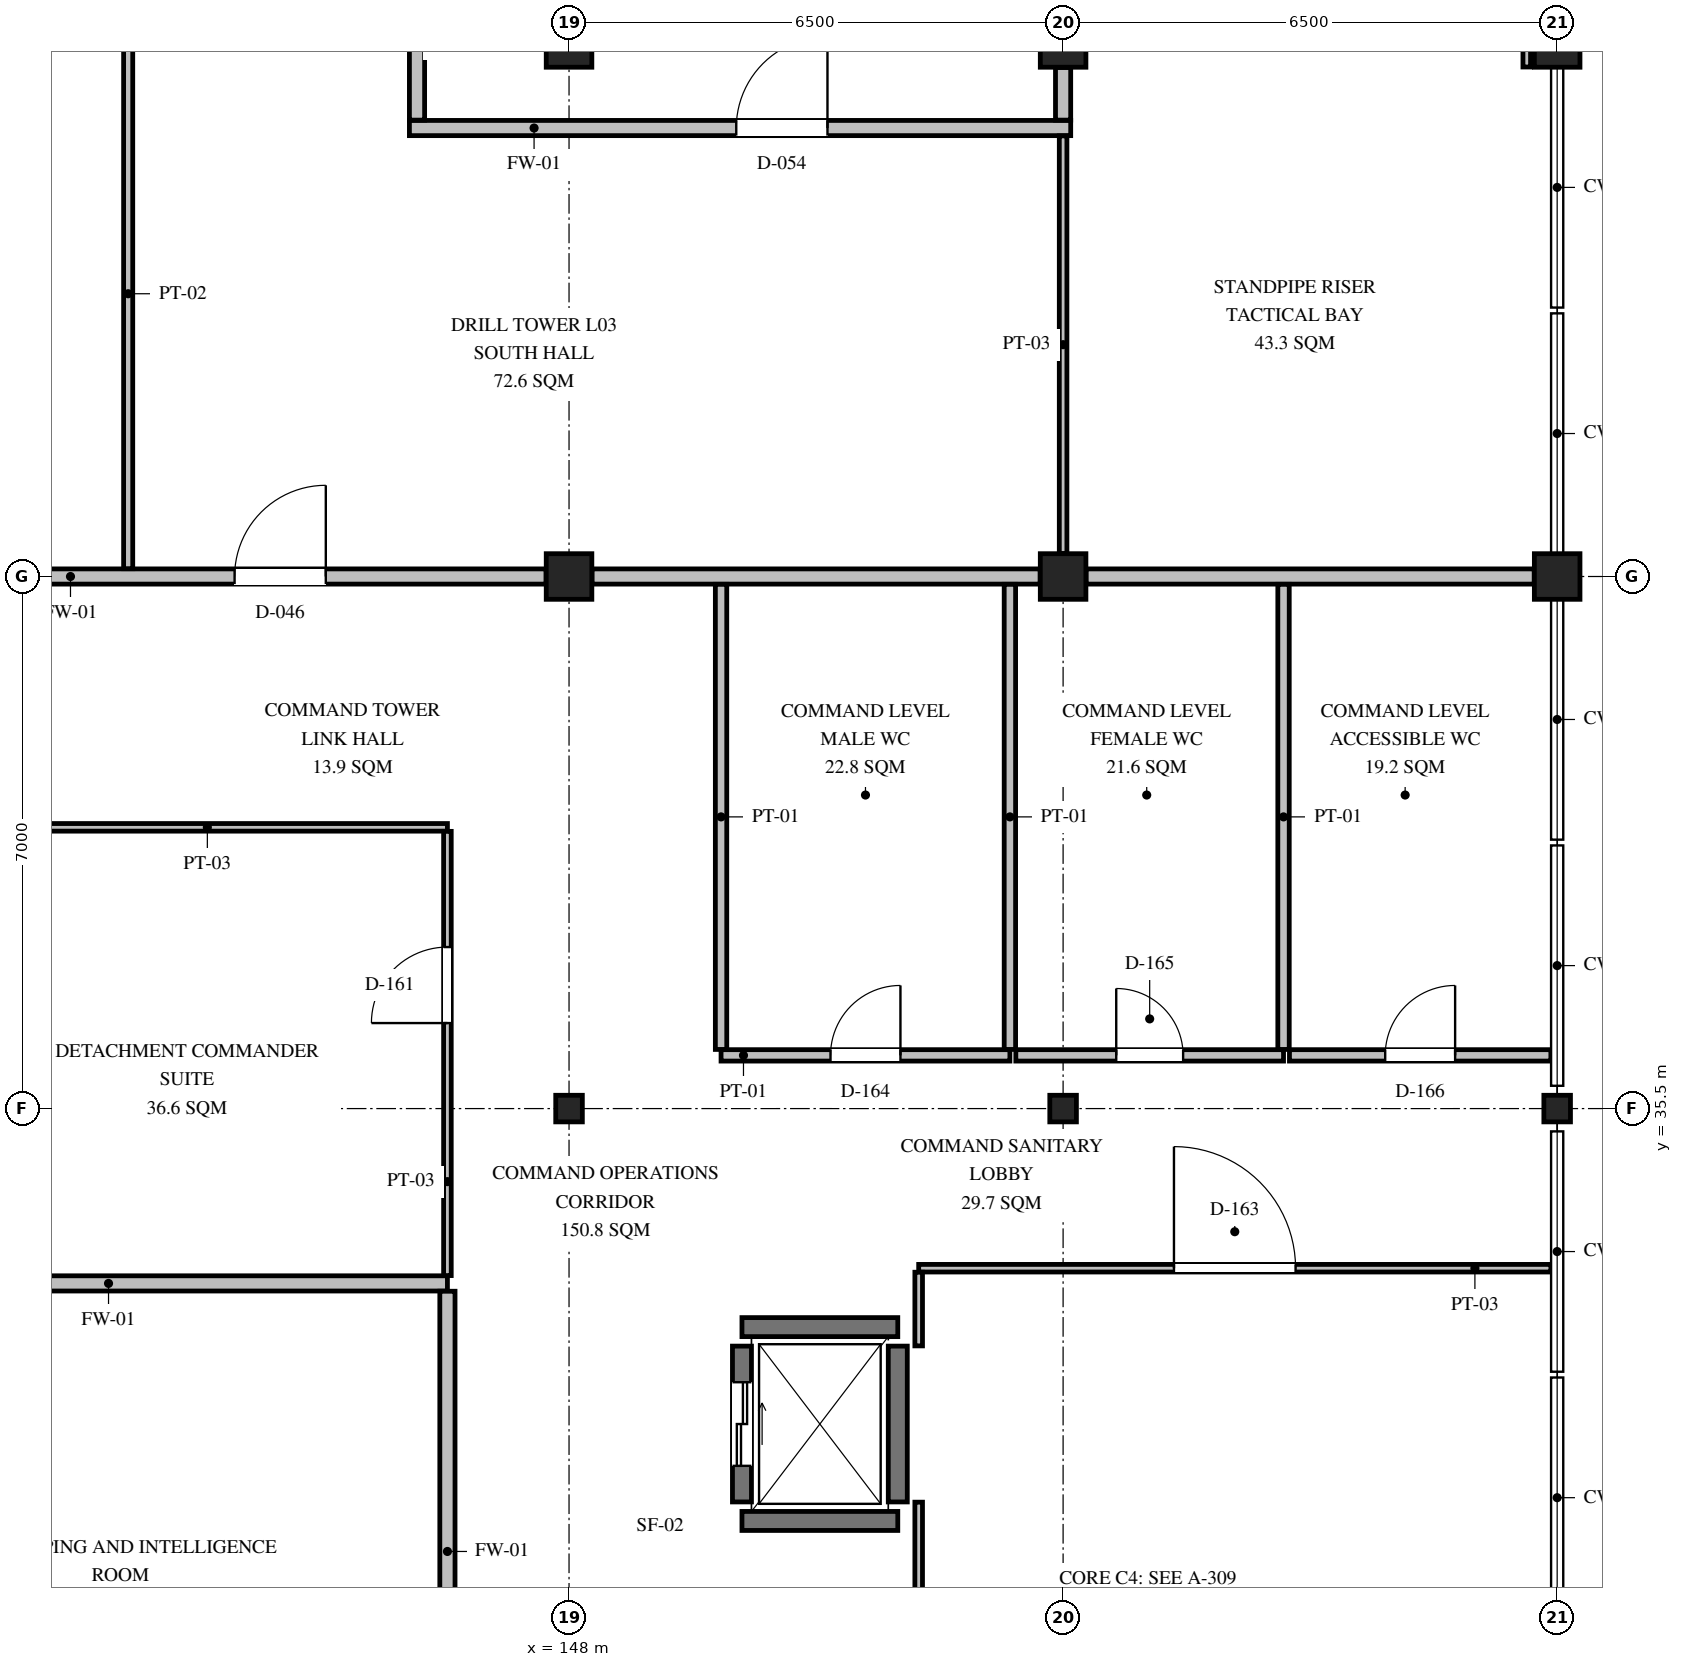
"""IFC4 building model, lengths in metres.
Left out: names, types, materials, properties, quantities, classifications, styles, units other than length and angle.
Written with IfcOpenShell. Run it as: python <this file> out.ifc"""

import sys

from ifc_helpers import new_model, si_unit, direction, frame, frame_2d, origin, origin_2d, place, context, subcontext, project, spatial, rectangle, i_section, extrude, element, fill, save


model = new_model("IFC4")
c1 = context("Model", 3, precision=1e-05, world=origin(), true_north=direction((0.0, 1.0)))
c2 = subcontext(c1, "Body", "Model", "MODEL_VIEW")
j1 = project(units=[si_unit("LENGTHUNIT", "METRE"), si_unit("PLANEANGLEUNIT", "RADIAN")], contexts=[c1])
p1 = place(None, origin())
s1 = spatial("IfcSite", under=j1, at=p1, CompositionType="ELEMENT")
p2 = place(p1, origin())
s2 = spatial("IfcBuilding", under=s1, at=p2, CompositionType="ELEMENT")
p3 = place(p2, frame((0.0, 0.0, 10.05)))
s3 = spatial("IfcBuildingStorey", under=s2, at=p3, CompositionType="ELEMENT", Elevation=10.05)
p4 = place(p3, frame((148.0, 35.5, 0.0), z_axis=(0.0, 0.0, 1.0), x_axis=(1.0, 0.0, 0.0)))
e1 = element("IfcColumn", 1, at=p4, inside=s3, PredefinedType="COLUMN", context=c2, shape_type="SweptSolid", body=[
    extrude(i_section(OverallWidth=0.35, OverallDepth=0.35, WebThickness=0.012, FlangeThickness=0.019, FilletRadius=0.02, at=origin_2d()), origin(), (0.0, 0.0, 1.0), 4.2),
])
for number, where, z_axis, x_axis in (
    (2, (148.0, 42.5, 0.0), (0.0, 0.0, 1.0), (1.0, 0.0, 0.0)),
    (3, (148.0, 49.5, 0.0), (0.0, 0.0, 1.0), (1.0, 0.0, 0.0)),
):
    element("IfcColumn", number, at=place(p3, frame(where, z_axis=z_axis, x_axis=x_axis)), inside=s3, PredefinedType="COLUMN", context=c2, shape_type="SweptSolid", body=[
        extrude(rectangle(XDim=0.6, YDim=0.6, at=origin_2d()), origin(), (0.0, 0.0, 1.0), 4.2),
    ])
p5 = place(p3, frame((154.5, 35.5, 0.0), z_axis=(0.0, 0.0, 1.0), x_axis=(1.0, 0.0, 0.0)))
e4 = element("IfcColumn", 4, at=p5, inside=s3, PredefinedType="COLUMN", context=c2, shape_type="SweptSolid", body=[
    extrude(i_section(OverallWidth=0.35, OverallDepth=0.35, WebThickness=0.012, FlangeThickness=0.019, FilletRadius=0.02, at=origin_2d()), origin(), (0.0, 0.0, 1.0), 4.2),
])
for number, where, z_axis, x_axis in (
    (5, (154.5, 42.5, 0.0), (0.0, 0.0, 1.0), (1.0, 0.0, 0.0)),
    (6, (154.5, 49.5, 0.0), (0.0, 0.0, 1.0), (1.0, 0.0, 0.0)),
):
    element("IfcColumn", number, at=place(p3, frame(where, z_axis=z_axis, x_axis=x_axis)), inside=s3, PredefinedType="COLUMN", context=c2, shape_type="SweptSolid", body=[
        extrude(rectangle(XDim=0.6, YDim=0.6, at=origin_2d()), origin(), (0.0, 0.0, 1.0), 4.2),
    ])
p6 = place(p3, frame((161.0, 35.5, 0.0), z_axis=(0.0, 0.0, 1.0), x_axis=(1.0, 0.0, 0.0)))
e7 = element("IfcColumn", 7, at=p6, inside=s3, PredefinedType="COLUMN", context=c2, shape_type="SweptSolid", body=[
    extrude(i_section(OverallWidth=0.35, OverallDepth=0.35, WebThickness=0.012, FlangeThickness=0.019, FilletRadius=0.02, at=origin_2d()), origin(), (0.0, 0.0, 1.0), 4.2),
])
for number, where, z_axis, x_axis in (
    (8, (161.0, 42.5, 0.0), (0.0, 0.0, 1.0), (1.0, 0.0, 0.0)),
    (9, (161.0, 49.5, 0.0), (0.0, 0.0, 1.0), (1.0, 0.0, 0.0)),
):
    element("IfcColumn", number, at=place(p3, frame(where, z_axis=z_axis, x_axis=x_axis)), inside=s3, PredefinedType="COLUMN", context=c2, shape_type="SweptSolid", body=[
        extrude(rectangle(XDim=0.6, YDim=0.6, at=origin_2d()), origin(), (0.0, 0.0, 1.0), 4.2),
    ])
for number, where, z_axis, x_axis in (
    (10, (150.275, 30.075, 0.0), (0.0, 0.0, 1.0), (1.0, 0.0, 0.0)),
    (11, (150.275, 32.625, 0.0), (0.0, 0.0, 1.0), (1.0, 0.0, 0.0)),
):
    element("IfcWall", number, at=place(p3, frame(where, z_axis=z_axis, x_axis=x_axis)), inside=s3, PredefinedType="SHEAR", context=c2, shape_type="SweptSolid", body=[
        extrude(rectangle(XDim=2.05, YDim=0.25, at=frame_2d((1.025, 0.0))), origin(), (0.0, 0.0, 1.0), 4.0),
    ])
p7 = place(p3, frame((150.275, 30.325, 0.0), z_axis=(0.0, 0.0, 1.0), x_axis=(0.0, 1.0, 0.0)))
e12 = element("IfcWall", 12, at=p7, inside=s3, PredefinedType="SHEAR", context=c2, shape_type="SweptSolid", body=[
    extrude(rectangle(XDim=2.05, YDim=0.25, at=frame_2d((1.025, 0.0))), origin(), (0.0, 0.0, 1.0), 4.0),
])
p8 = place(p7, frame((0.475, 0.0, 0.0)))
e13 = element("IfcOpeningElement", 13, at=p8, cuts=e12, PredefinedType="OPENING", context=c2, shape_type="SweptSolid", body=[
    extrude(rectangle(XDim=1.1, YDim=2.15, at=frame_2d((0.55, 1.075))), frame((0.0, 0.135, 0.0), z_axis=(0.0, -1.0, 0.0), x_axis=(1.0, 0.0, 0.0)), (0.0, 0.0, 1.0), 0.27),
])
p9 = place(p3, frame((152.325, 30.325, 0.0), z_axis=(0.0, 0.0, 1.0), x_axis=(0.0, 1.0, 0.0)))
e14 = element("IfcWall", 14, at=p9, inside=s3, PredefinedType="SHEAR", context=c2, shape_type="SweptSolid", body=[
    extrude(rectangle(XDim=2.05, YDim=0.25, at=frame_2d((1.025, 0.0))), origin(), (0.0, 0.0, 1.0), 4.0),
])
p10 = place(p3, frame((140.302, 42.5, 0.0), z_axis=(0.0, 0.0, 1.0), x_axis=(1.0, 0.0, 0.0)))
e15 = element("IfcWall", 15, at=p10, inside=s3, PredefinedType="PARTITIONING", context=c2, shape_type="SweptSolid", body=[
    extrude(rectangle(XDim=7.396, YDim=0.2, at=frame_2d((3.698, 0.0))), origin(), (0.0, 0.0, 1.0), 3.494),
])
p11 = place(p10, frame((3.298, 0.0, 0.0)))
e16 = element("IfcOpeningElement", 16, at=p11, cuts=e15, PredefinedType="OPENING", context=c2, shape_type="SweptSolid", body=[
    extrude(rectangle(XDim=1.2, YDim=2.15, at=frame_2d((0.6, 1.075))), frame((0.0, 0.11, 0.0), z_axis=(0.0, -1.0, 0.0), x_axis=(1.0, 0.0, 0.0)), (0.0, 0.0, 1.0), 0.22),
])
p12 = place(p3, frame((148.302, 42.5, 0.0), z_axis=(0.0, 0.0, 1.0), x_axis=(1.0, 0.0, 0.0)))
e17 = element("IfcWall", 17, at=p12, inside=s3, PredefinedType="PARTITIONING", context=c2, shape_type="SweptSolid", body=[
    extrude(rectangle(XDim=5.896, YDim=0.2, at=frame_2d((2.948, 0.0))), origin(), (0.0, 0.0, 1.0), 3.554),
])
p13 = place(p3, frame((154.802, 42.5, 0.0), z_axis=(0.0, 0.0, 1.0), x_axis=(1.0, 0.0, 0.0)))
e18 = element("IfcWall", 18, at=p13, inside=s3, PredefinedType="PARTITIONING", context=c2, shape_type="SweptSolid", body=[
    extrude(rectangle(XDim=5.896, YDim=0.2, at=frame_2d((2.948, 0.0))), origin(), (0.0, 0.0, 1.0), 3.604),
])
p14 = place(p3, frame((145.9, 48.4, 0.0), z_axis=(0.0, 0.0, 1.0), x_axis=(1.0, 0.0, 0.0)))
e19 = element("IfcWall", 19, at=p14, inside=s3, PredefinedType="PARTITIONING", context=c2, shape_type="SweptSolid", body=[
    extrude(rectangle(XDim=8.7, YDim=0.2, at=frame_2d((4.35, 0.0))), origin(), (0.0, 0.0, 1.0), 4.0),
])
p15 = place(p14, frame((4.3, 0.0, 0.0)))
e20 = element("IfcOpeningElement", 20, at=p15, cuts=e19, PredefinedType="OPENING", context=c2, shape_type="SweptSolid", body=[
    extrude(rectangle(XDim=1.2, YDim=2.15, at=frame_2d((0.6, 1.075))), frame((0.0, 0.11, 0.0), z_axis=(0.0, -1.0, 0.0), x_axis=(1.0, 0.0, 0.0)), (0.0, 0.0, 1.0), 0.22),
])
p16 = place(p3, frame((146.0, 48.504, 0.0), z_axis=(0.0, 0.0, 1.0), x_axis=(0.0, 1.0, 0.0)))
e21 = element("IfcWall", 21, at=p16, inside=s3, PredefinedType="PARTITIONING", context=c2, shape_type="SweptSolid", body=[
    extrude(rectangle(XDim=3.967, YDim=0.2, at=frame_2d((1.983, 0.0))), origin(), (0.0, 0.0, 1.0), 4.0),
])
p17 = place(p16, frame((1.946, 0.0, 0.0)))
e22 = element("IfcOpeningElement", 22, at=p17, cuts=e21, PredefinedType="OPENING", context=c2, shape_type="SweptSolid", body=[
    extrude(rectangle(XDim=1.2, YDim=2.15, at=frame_2d((0.6, 1.075))), frame((0.0, 0.11, 0.0), z_axis=(0.0, -1.0, 0.0), x_axis=(1.0, 0.0, 0.0)), (0.0, 0.0, 1.0), 0.22),
])
p18 = place(p3, frame((154.5, 48.504, 0.0), z_axis=(0.0, 0.0, 1.0), x_axis=(0.0, 1.0, 0.0)))
e23 = element("IfcWall", 23, at=p18, inside=s3, PredefinedType="PARTITIONING", context=c2, shape_type="SweptSolid", body=[
    extrude(rectangle(XDim=0.692, YDim=0.2, at=frame_2d((0.346, 0.0))), origin(), (0.0, 0.0, 1.0), 3.494),
])
p19 = place(p3, frame((137.483, 33.2, 0.0), z_axis=(0.0, 0.0, 1.0), x_axis=(1.0, 0.0, 0.0)))
e24 = element("IfcWall", 24, at=p19, inside=s3, PredefinedType="PARTITIONING", context=c2, shape_type="SweptSolid", body=[
    extrude(rectangle(XDim=8.917, YDim=0.2, at=frame_2d((4.458, 0.0))), origin(), (0.0, 0.0, 1.0), 4.0),
])
p20 = place(p3, frame((146.4, 16.703, 0.0), z_axis=(0.0, 0.0, 1.0), x_axis=(0.0, 1.0, 0.0)))
e25 = element("IfcWall", 25, at=p20, inside=s3, PredefinedType="PARTITIONING", context=c2, shape_type="SweptSolid", body=[
    extrude(rectangle(XDim=16.394, YDim=0.2, at=frame_2d((8.197, 0.0))), origin(), (0.0, 0.0, 1.0), 3.644),
])
p21 = place(p20, frame((7.697, 0.0, 0.0)))
e26 = element("IfcOpeningElement", 26, at=p21, cuts=e25, PredefinedType="OPENING", context=c2, shape_type="SweptSolid", body=[
    extrude(rectangle(XDim=1.0, YDim=2.1, at=frame_2d((0.5, 1.05))), frame((0.0, 0.11, 0.0), z_axis=(0.0, -1.0, 0.0), x_axis=(1.0, 0.0, 0.0)), (0.0, 0.0, 1.0), 0.22),
])
p22 = place(p3, frame((140.083, 39.2, 0.0), z_axis=(0.0, 0.0, 1.0), x_axis=(1.0, 0.0, 0.0)))
e27 = element("IfcWall", 27, at=p22, inside=s3, PredefinedType="PARTITIONING", context=c2, shape_type="SweptSolid", body=[
    extrude(rectangle(XDim=6.317, YDim=0.1, at=frame_2d((3.158, 0.0))), origin(), (0.0, 0.0, 1.0), 4.0),
])
p23 = place(p3, frame((146.4, 33.303, 0.0), z_axis=(0.0, 0.0, 1.0), x_axis=(0.0, 1.0, 0.0)))
e28 = element("IfcWall", 28, at=p23, inside=s3, PredefinedType="PARTITIONING", context=c2, shape_type="SweptSolid", body=[
    extrude(rectangle(XDim=5.844, YDim=0.1, at=frame_2d((2.922, 0.0))), origin(), (0.0, 0.0, 1.0), 3.7),
])
p24 = place(p23, frame((3.322, 0.0, 0.0)))
e29 = element("IfcOpeningElement", 29, at=p24, cuts=e28, PredefinedType="OPENING", context=c2, shape_type="SweptSolid", body=[
    extrude(rectangle(XDim=1.0, YDim=2.1, at=frame_2d((0.5, 1.05))), frame((0.0, 0.06, 0.0), z_axis=(0.0, -1.0, 0.0), x_axis=(1.0, 0.0, 0.0)), (0.0, 0.0, 1.0), 0.12),
])
p25 = place(p3, frame((152.6, 33.4, 0.0), z_axis=(0.0, 0.0, 1.0), x_axis=(1.0, 0.0, 0.0)))
e30 = element("IfcWall", 30, at=p25, inside=s3, PredefinedType="PARTITIONING", context=c2, shape_type="SweptSolid", body=[
    extrude(rectangle(XDim=8.317, YDim=0.1, at=frame_2d((4.158, 0.0))), origin(), (0.0, 0.0, 1.0), 4.0),
])
p26 = place(p25, frame((3.358, 0.0, 0.0)))
e31 = element("IfcOpeningElement", 31, at=p26, cuts=e30, PredefinedType="OPENING", context=c2, shape_type="SweptSolid", body=[
    extrude(rectangle(XDim=1.6, YDim=2.2, at=frame_2d((0.8, 1.1))), frame((0.0, 0.06, 0.0), z_axis=(0.0, -1.0, 0.0), x_axis=(1.0, 0.0, 0.0)), (0.0, 0.0, 1.0), 0.12),
])
p27 = place(p3, frame((152.6, 26.178, 0.0), z_axis=(0.0, 0.0, 1.0), x_axis=(0.0, 1.0, 0.0)))
e32 = element("IfcWall", 32, at=p27, inside=s3, PredefinedType="PARTITIONING", context=c2, shape_type="SweptSolid", body=[
    extrude(rectangle(XDim=4.144, YDim=0.1, at=frame_2d((2.072, 0.0))), origin(), (0.0, 0.0, 1.0), 4.0),
])
p28 = place(p3, frame((152.6, 32.378, 0.0), z_axis=(0.0, 0.0, 1.0), x_axis=(0.0, 1.0, 0.0)))
e33 = element("IfcWall", 33, at=p28, inside=s3, PredefinedType="PARTITIONING", context=c2, shape_type="SweptSolid", body=[
    extrude(rectangle(XDim=0.969, YDim=0.1, at=frame_2d((0.484, 0.0))), origin(), (0.0, 0.0, 1.0), 4.0),
])
p29 = place(p3, frame((150.0, 36.2, 0.0), z_axis=(0.0, 0.0, 1.0), x_axis=(1.0, 0.0, 0.0)))
e34 = element("IfcWall", 34, at=p29, inside=s3, PredefinedType="PARTITIONING", context=c2, shape_type="SweptSolid", body=[
    extrude(rectangle(XDim=3.8, YDim=0.15, at=frame_2d((1.9, 0.0))), origin(), (0.0, 0.0, 1.0), 4.0),
])
p30 = place(p29, frame((1.44, 0.0, 0.0)))
e35 = element("IfcOpeningElement", 35, at=p30, cuts=e34, PredefinedType="OPENING", context=c2, shape_type="SweptSolid", body=[
    extrude(rectangle(XDim=0.92, YDim=2.1, at=frame_2d((0.46, 1.05))), frame((0.0, 0.085, 0.0), z_axis=(0.0, -1.0, 0.0), x_axis=(1.0, 0.0, 0.0)), (0.0, 0.0, 1.0), 0.17),
])
p31 = place(p3, frame((150.0, 36.278, 0.0), z_axis=(0.0, 0.0, 1.0), x_axis=(0.0, 1.0, 0.0)))
e36 = element("IfcWall", 36, at=p31, inside=s3, PredefinedType="PARTITIONING", context=c2, shape_type="SweptSolid", body=[
    extrude(rectangle(XDim=6.119, YDim=0.15, at=frame_2d((3.06, 0.0))), origin(), (0.0, 0.0, 1.0), 3.75),
])
p32 = place(p3, frame((153.8, 36.278, 0.0), z_axis=(0.0, 0.0, 1.0), x_axis=(0.0, 1.0, 0.0)))
e37 = element("IfcWall", 37, at=p32, inside=s3, PredefinedType="PARTITIONING", context=c2, shape_type="SweptSolid", body=[
    extrude(rectangle(XDim=6.119, YDim=0.15, at=frame_2d((3.06, 0.0))), origin(), (0.0, 0.0, 1.0), 4.0),
])
p33 = place(p3, frame((153.878, 36.2, 0.0), z_axis=(0.0, 0.0, 1.0), x_axis=(1.0, 0.0, 0.0)))
e38 = element("IfcWall", 38, at=p33, inside=s3, PredefinedType="PARTITIONING", context=c2, shape_type="SweptSolid", body=[
    extrude(rectangle(XDim=3.522, YDim=0.15, at=frame_2d((1.761, 0.0))), origin(), (0.0, 0.0, 1.0), 4.0),
])
p34 = place(p33, frame((1.321, 0.0, 0.0)))
e39 = element("IfcOpeningElement", 39, at=p34, cuts=e38, PredefinedType="OPENING", context=c2, shape_type="SweptSolid", body=[
    extrude(rectangle(XDim=0.88, YDim=2.1, at=frame_2d((0.44, 1.05))), frame((0.0, 0.085, 0.0), z_axis=(0.0, -1.0, 0.0), x_axis=(1.0, 0.0, 0.0)), (0.0, 0.0, 1.0), 0.17),
])
p35 = place(p3, frame((157.4, 36.278, 0.0), z_axis=(0.0, 0.0, 1.0), x_axis=(0.0, 1.0, 0.0)))
e40 = element("IfcWall", 40, at=p35, inside=s3, PredefinedType="PARTITIONING", context=c2, shape_type="SweptSolid", body=[
    extrude(rectangle(XDim=6.119, YDim=0.15, at=frame_2d((3.06, 0.0))), origin(), (0.0, 0.0, 1.0), 4.0),
])
p36 = place(p3, frame((157.478, 36.2, 0.0), z_axis=(0.0, 0.0, 1.0), x_axis=(1.0, 0.0, 0.0)))
e41 = element("IfcWall", 41, at=p36, inside=s3, PredefinedType="PARTITIONING", context=c2, shape_type="SweptSolid", body=[
    extrude(rectangle(XDim=3.439, YDim=0.15, at=frame_2d((1.719, 0.0))), origin(), (0.0, 0.0, 1.0), 4.0),
])
p37 = place(p36, frame((1.26, 0.0, 0.0)))
e42 = element("IfcOpeningElement", 42, at=p37, cuts=e41, PredefinedType="OPENING", context=c2, shape_type="SweptSolid", body=[
    extrude(rectangle(XDim=0.92, YDim=2.1, at=frame_2d((0.46, 1.05))), frame((0.0, 0.085, 0.0), z_axis=(0.0, -1.0, 0.0), x_axis=(1.0, 0.0, 0.0)), (0.0, 0.0, 1.0), 0.17),
])
p38 = place(p3, frame((142.2, 42.603, 0.0), z_axis=(0.0, 0.0, 1.0), x_axis=(0.0, 1.0, 0.0)))
e43 = element("IfcWall", 43, at=p38, inside=s3, PredefinedType="PARTITIONING", context=c2, shape_type="SweptSolid", body=[
    extrude(rectangle(XDim=7.234, YDim=0.12, at=frame_2d((3.617, 0.0))), origin(), (0.0, 0.0, 1.0), 4.0),
])
p39 = place(p3, frame((154.5, 42.803, 0.0), z_axis=(0.0, 0.0, 1.0), x_axis=(0.0, 1.0, 0.0)))
e44 = element("IfcWall", 44, at=p39, inside=s3, PredefinedType="PARTITIONING", context=c2, shape_type="SweptSolid", body=[
    extrude(rectangle(XDim=5.494, YDim=0.1, at=frame_2d((2.747, 0.0))), origin(), (0.0, 0.0, 1.0), 3.494),
])
p40 = place(p3, frame((160.6, 49.203, 0.0), z_axis=(0.0, 0.0, 1.0), x_axis=(0.0, 1.0, 0.0)))
e45 = element("IfcWall", 45, at=p40, inside=s3, PredefinedType="PARTITIONING", context=c2, shape_type="SweptSolid", body=[
    extrude(rectangle(XDim=0.594, YDim=0.1, at=frame_2d((0.297, 0.0))), origin(), (0.0, 0.0, 1.0), 4.0),
])
p41 = place(p8, origin())
e46 = element("IfcDoor", 46, at=p41, inside=s3, OperationType="DOUBLE_DOOR_SLIDING", PredefinedType="DOOR", context=c2, shape_type="SweptSolid", body=[
    extrude(rectangle(XDim=1.1, YDim=2.15, at=frame_2d((0.55, 1.075))), frame((0.0, 0.025, 0.0), z_axis=(0.0, -1.0, 0.0), x_axis=(1.0, 0.0, 0.0)), (0.0, 0.0, 1.0), 0.05),
])
fill(e13, e46)
p42 = place(p11, origin())
e47 = element("IfcDoor", 47, at=p42, inside=s3, OperationType="SINGLE_SWING_RIGHT", PredefinedType="DOOR", context=c2, shape_type="SweptSolid", body=[
    extrude(rectangle(XDim=1.2, YDim=2.15, at=frame_2d((0.6, 1.075))), frame((0.0, 0.025, 0.0), z_axis=(0.0, -1.0, 0.0), x_axis=(1.0, 0.0, 0.0)), (0.0, 0.0, 1.0), 0.05),
])
fill(e16, e47)
p43 = place(p15, origin())
e48 = element("IfcDoor", 48, at=p43, inside=s3, OperationType="SINGLE_SWING_RIGHT", PredefinedType="DOOR", context=c2, shape_type="SweptSolid", body=[
    extrude(rectangle(XDim=1.2, YDim=2.15, at=frame_2d((0.6, 1.075))), frame((0.0, 0.025, 0.0), z_axis=(0.0, -1.0, 0.0), x_axis=(1.0, 0.0, 0.0)), (0.0, 0.0, 1.0), 0.05),
])
fill(e20, e48)
p44 = place(p24, origin())
e49 = element("IfcDoor", 49, at=p44, inside=s3, OperationType="SINGLE_SWING_LEFT", PredefinedType="DOOR", context=c2, shape_type="SweptSolid", body=[
    extrude(rectangle(XDim=1.0, YDim=2.1, at=frame_2d((0.5, 1.05))), frame((0.0, 0.025, 0.0), z_axis=(0.0, -1.0, 0.0), x_axis=(1.0, 0.0, 0.0)), (0.0, 0.0, 1.0), 0.05),
])
fill(e29, e49)
p45 = place(p26, origin())
e50 = element("IfcDoor", 50, at=p45, inside=s3, OperationType="SINGLE_SWING_LEFT", PredefinedType="DOOR", context=c2, shape_type="SweptSolid", body=[
    extrude(rectangle(XDim=1.6, YDim=2.2, at=frame_2d((0.8, 1.1))), frame((0.0, 0.025, 0.0), z_axis=(0.0, -1.0, 0.0), x_axis=(1.0, 0.0, 0.0)), (0.0, 0.0, 1.0), 0.05),
])
fill(e31, e50)
p46 = place(p30, origin())
e51 = element("IfcDoor", 51, at=p46, inside=s3, OperationType="SINGLE_SWING_RIGHT", PredefinedType="DOOR", context=c2, shape_type="SweptSolid", body=[
    extrude(rectangle(XDim=0.92, YDim=2.1, at=frame_2d((0.46, 1.05))), frame((0.0, 0.025, 0.0), z_axis=(0.0, -1.0, 0.0), x_axis=(1.0, 0.0, 0.0)), (0.0, 0.0, 1.0), 0.05),
])
fill(e35, e51)
p47 = place(p34, origin())
e52 = element("IfcDoor", 52, at=p47, inside=s3, OperationType="SINGLE_SWING_LEFT", PredefinedType="DOOR", context=c2, shape_type="SweptSolid", body=[
    extrude(rectangle(XDim=0.88, YDim=2.1, at=frame_2d((0.44, 1.05))), frame((0.0, 0.025, 0.0), z_axis=(0.0, -1.0, 0.0), x_axis=(1.0, 0.0, 0.0)), (0.0, 0.0, 1.0), 0.05),
])
fill(e39, e52)
p48 = place(p37, origin())
e53 = element("IfcDoor", 53, at=p48, inside=s3, OperationType="SINGLE_SWING_RIGHT", PredefinedType="DOOR", context=c2, shape_type="SweptSolid", body=[
    extrude(rectangle(XDim=0.92, YDim=2.1, at=frame_2d((0.46, 1.05))), frame((0.0, 0.025, 0.0), z_axis=(0.0, -1.0, 0.0), x_axis=(1.0, 0.0, 0.0)), (0.0, 0.0, 1.0), 0.05),
])
fill(e42, e53)
save(model, sys.argv[1])
